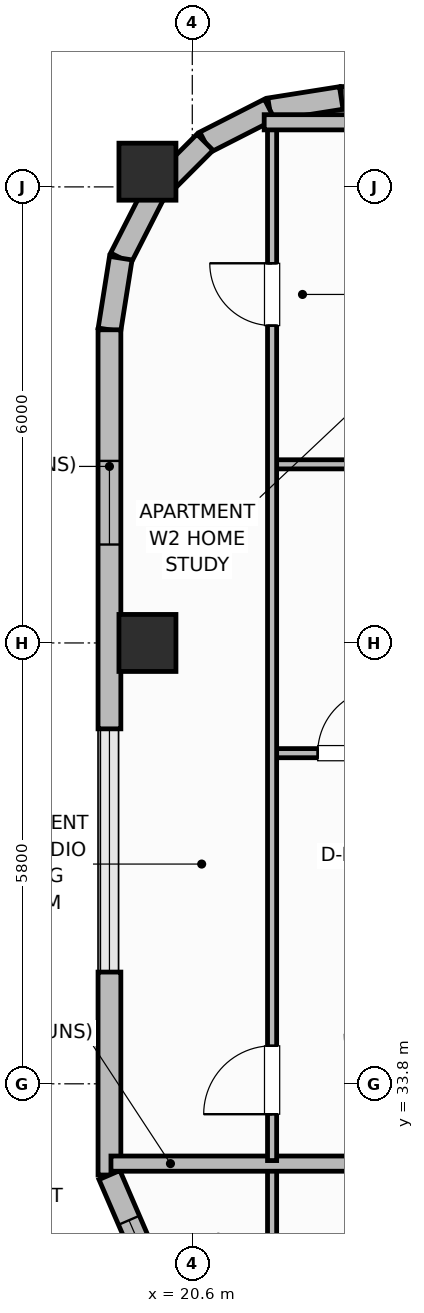
"""IFC4 building model, lengths in metres.
Left out: names, types, materials, properties, quantities, classifications, styles, units other than length and angle.
Written with IfcOpenShell. Run it as: python <this file> out.ifc"""

import sys

from ifc_helpers import new_model, si_unit, direction, frame, frame_2d, origin, origin_2d, place, context, subcontext, project, spatial, rectangle, extrude, element, fill, save


model = new_model("IFC4")
c1 = context("Model", 3, precision=1e-05, world=origin(), true_north=direction((0.0, 1.0)))
c2 = subcontext(c1, "Body", "Model", "MODEL_VIEW")
j1 = project(units=[si_unit("LENGTHUNIT", "METRE"), si_unit("PLANEANGLEUNIT", "RADIAN")], contexts=[c1])
p1 = place(None, origin())
s1 = spatial("IfcSite", under=j1, at=p1, CompositionType="ELEMENT")
p2 = place(p1, origin())
s2 = spatial("IfcBuilding", under=s1, at=p2, CompositionType="ELEMENT")
p3 = place(p2, frame((0.0, 0.0, 293.5)))
s3 = spatial("IfcBuildingStorey", under=s2, at=p3, CompositionType="ELEMENT", Elevation=293.5)
for number, where, z_axis, x_axis in (
    (1, (20.01, 39.6, 0.0), (0.0, 0.0, 1.0), (1.0, 0.0, 0.0)),
    (2, (20.01, 45.8, 0.0), (0.0, 0.0, 1.0), (1.0, 0.0, 0.0)),
):
    element("IfcColumn", number, at=place(p3, frame(where, z_axis=z_axis, x_axis=x_axis)), inside=s3, PredefinedType="COLUMN", context=c2, shape_type="SweptSolid", body=[
        extrude(rectangle(XDim=0.75, YDim=0.75, at=origin_2d()), origin(), (0.0, 0.0, 1.0), 3.7),
    ])
p4 = place(p3, frame((48.19, 46.77, 0.0), z_axis=(0.0, 0.0, 1.0), x_axis=(-1.0, 0.0, 0.0)))
e3 = element("IfcWall", 3, at=p4, inside=s3, PredefinedType="SOLIDWALL", context=c2, shape_type="SweptSolid", body=[
    extrude(rectangle(XDim=25.63, YDim=0.3, at=frame_2d((12.815, 0.0))), origin(), (0.0, 0.0, 1.0), 2.71),
])
p5 = place(p4, frame((1.471, 0.0, 0.74)))
e4 = element("IfcOpeningElement", 4, at=p5, cuts=e3, PredefinedType="OPENING", context=c2, shape_type="SweptSolid", body=[
    extrude(rectangle(XDim=1.4, YDim=1.85, at=frame_2d((0.7, 0.925))), frame((0.0, 0.16, 0.0), z_axis=(0.0, -1.0, 0.0), x_axis=(1.0, 0.0, 0.0)), (0.0, 0.0, 1.0), 0.32),
])
p6 = place(p4, frame((7.553, 0.0, 0.74)))
e5 = element("IfcOpeningElement", 5, at=p6, cuts=e3, PredefinedType="OPENING", context=c2, shape_type="SweptSolid", body=[
    extrude(rectangle(XDim=1.4, YDim=1.85, at=frame_2d((0.7, 0.925))), frame((0.0, 0.16, 0.0), z_axis=(0.0, -1.0, 0.0), x_axis=(1.0, 0.0, 0.0)), (0.0, 0.0, 1.0), 0.32),
])
p7 = place(p4, frame((10.244, 0.0, 0.74)))
e6 = element("IfcOpeningElement", 6, at=p7, cuts=e3, PredefinedType="OPENING", context=c2, shape_type="SweptSolid", body=[
    extrude(rectangle(XDim=1.4, YDim=1.85, at=frame_2d((0.7, 0.925))), frame((0.0, 0.16, 0.0), z_axis=(0.0, -1.0, 0.0), x_axis=(1.0, 0.0, 0.0)), (0.0, 0.0, 1.0), 0.32),
])
p8 = place(p4, frame((14.336, 0.0, 0.74)))
e7 = element("IfcOpeningElement", 7, at=p8, cuts=e3, PredefinedType="OPENING", context=c2, shape_type="SweptSolid", body=[
    extrude(rectangle(XDim=1.4, YDim=1.85, at=frame_2d((0.7, 0.925))), frame((0.0, 0.16, 0.0), z_axis=(0.0, -1.0, 0.0), x_axis=(1.0, 0.0, 0.0)), (0.0, 0.0, 1.0), 0.32),
])
p9 = place(p4, frame((16.677, 0.0, 0.74)))
e8 = element("IfcOpeningElement", 8, at=p9, cuts=e3, PredefinedType="OPENING", context=c2, shape_type="SweptSolid", body=[
    extrude(rectangle(XDim=1.4, YDim=1.85, at=frame_2d((0.7, 0.925))), frame((0.0, 0.16, 0.0), z_axis=(0.0, -1.0, 0.0), x_axis=(1.0, 0.0, 0.0)), (0.0, 0.0, 1.0), 0.32),
])
p10 = place(p4, frame((19.718, 0.0, 0.74)))
e9 = element("IfcOpeningElement", 9, at=p10, cuts=e3, PredefinedType="OPENING", context=c2, shape_type="SweptSolid", body=[
    extrude(rectangle(XDim=1.4, YDim=1.85, at=frame_2d((0.7, 0.925))), frame((0.0, 0.16, 0.0), z_axis=(0.0, -1.0, 0.0), x_axis=(1.0, 0.0, 0.0)), (0.0, 0.0, 1.0), 0.32),
])
p11 = place(p3, frame((22.56, 46.77, 0.0), z_axis=(0.0, 0.0, 1.0), x_axis=(-0.987669453596, -0.156553666304, 0.0)))
e10 = element("IfcWall", 10, at=p11, inside=s3, PredefinedType="SOLIDWALL", context=c2, shape_type="SweptSolid", body=[
    extrude(rectangle(XDim=0.954, YDim=0.3, at=frame_2d((0.477, 0.0))), origin(), (0.0, 0.0, 1.0), 2.71),
])
p12 = place(p3, frame((21.617, 46.621, 0.0), z_axis=(0.0, 0.0, 1.0), x_axis=(-0.891023873617, -0.45395644796, 0.0)))
e11 = element("IfcWall", 11, at=p12, inside=s3, PredefinedType="SOLIDWALL", context=c2, shape_type="SweptSolid", body=[
    extrude(rectangle(XDim=0.954, YDim=0.3, at=frame_2d((0.477, 0.0))), origin(), (0.0, 0.0, 1.0), 2.71),
])
p13 = place(p3, frame((20.767, 46.188, 0.0), z_axis=(0.0, 0.0, 1.0), x_axis=(-0.707106781187, -0.707106781187, 0.0)))
e12 = element("IfcWall", 12, at=p13, inside=s3, PredefinedType="SOLIDWALL", context=c2, shape_type="SweptSolid", body=[
    extrude(rectangle(XDim=0.954, YDim=0.3, at=frame_2d((0.477, 0.0))), origin(), (0.0, 0.0, 1.0), 2.71),
])
p14 = place(p3, frame((20.093, 45.513, 0.0), z_axis=(0.0, 0.0, 1.0), x_axis=(-0.454159573051, -0.890920356825, 0.0)))
e13 = element("IfcWall", 13, at=p14, inside=s3, PredefinedType="SOLIDWALL", context=c2, shape_type="SweptSolid", body=[
    extrude(rectangle(XDim=0.954, YDim=0.3, at=frame_2d((0.477, 0.0))), origin(), (0.0, 0.0, 1.0), 2.71),
])
p15 = place(p3, frame((19.659, 44.663, 0.0), z_axis=(0.0, 0.0, 1.0), x_axis=(-0.156304114255, -0.987708977314, 0.0)))
e14 = element("IfcWall", 14, at=p15, inside=s3, PredefinedType="SOLIDWALL", context=c2, shape_type="SweptSolid", body=[
    extrude(rectangle(XDim=0.954, YDim=0.3, at=frame_2d((0.477, 0.0))), origin(), (0.0, 0.0, 1.0), 2.71),
])
p16 = place(p3, frame((19.51, 43.72, 0.0), z_axis=(0.0, 0.0, 1.0), x_axis=(0.0, -1.0, 0.0)))
e15 = element("IfcWall", 15, at=p16, inside=s3, PredefinedType="SOLIDWALL", context=c2, shape_type="SweptSolid", body=[
    extrude(rectangle(XDim=5.25, YDim=0.3, at=frame_2d((2.625, 0.0))), origin(), (0.0, 0.0, 1.0), 2.71),
])
p17 = place(p16, frame((1.725, 0.0, 0.94)))
e16 = element("IfcOpeningElement", 16, at=p17, cuts=e15, PredefinedType="OPENING", context=c2, shape_type="SweptSolid", body=[
    extrude(rectangle(XDim=1.1, YDim=1.65, at=frame_2d((0.55, 0.825))), frame((0.0, 0.16, 0.0), z_axis=(0.0, -1.0, 0.0), x_axis=(1.0, 0.0, 0.0)), (0.0, 0.0, 1.0), 0.32),
])
p18 = place(p3, frame((19.51, 35.27, 0.0), z_axis=(0.0, 0.0, 1.0), x_axis=(0.0, -1.0, 0.0)))
e17 = element("IfcWall", 17, at=p18, inside=s3, PredefinedType="SOLIDWALL", context=c2, shape_type="SweptSolid", body=[
    extrude(rectangle(XDim=2.67, YDim=0.3, at=frame_2d((1.335, 0.0))), origin(), (0.0, 0.0, 1.0), 2.71),
])
p19 = place(p3, frame((19.51, 32.6, 0.0), z_axis=(0.0, 0.0, 1.0), x_axis=(0.396389181543, -0.918082576218, 0.0)))
e18 = element("IfcWall", 18, at=p19, inside=s3, PredefinedType="SOLIDWALL", context=c2, shape_type="SweptSolid", body=[
    extrude(rectangle(XDim=2.396, YDim=0.3, at=frame_2d((1.198, 0.0))), origin(), (0.0, 0.0, 1.0), 2.71),
])
p20 = place(p19, frame((0.648, 0.0, 0.9)))
e19 = element("IfcOpeningElement", 19, at=p20, cuts=e18, PredefinedType="OPENING", context=c2, shape_type="SweptSolid", body=[
    extrude(rectangle(XDim=1.1, YDim=1.65, at=frame_2d((0.55, 0.825))), frame((0.0, 0.16, 0.0), z_axis=(0.0, -1.0, 0.0), x_axis=(1.0, 0.0, 0.0)), (0.0, 0.0, 1.0), 0.32),
])
p21 = place(p3, frame((21.65, 9.99, 0.0), z_axis=(0.0, 0.0, 1.0), x_axis=(0.0, 1.0, 0.0)))
e20 = element("IfcWall", 20, at=p21, inside=s3, PredefinedType="PARTITIONING", context=c2, shape_type="SweptSolid", body=[
    extrude(rectangle(XDim=22.72, YDim=0.12, at=frame_2d((11.36, 0.0))), origin(), (0.0, 0.0, 1.0), 2.54),
])
p22 = place(p21, frame((0.41, 0.0, 0.0)))
e21 = element("IfcOpeningElement", 21, at=p22, cuts=e20, PredefinedType="OPENING", context=c2, shape_type="SweptSolid", body=[
    extrude(rectangle(XDim=0.9, YDim=2.1, at=frame_2d((0.45, 1.05))), frame((0.0, 0.07, 0.0), z_axis=(0.0, -1.0, 0.0), x_axis=(1.0, 0.0, 0.0)), (0.0, 0.0, 1.0), 0.14),
])
p23 = place(p21, frame((15.535, 0.0, 0.0)))
e22 = element("IfcOpeningElement", 22, at=p23, cuts=e20, PredefinedType="OPENING", context=c2, shape_type="SweptSolid", body=[
    extrude(rectangle(XDim=0.82, YDim=2.08, at=frame_2d((0.41, 1.04))), frame((0.0, 0.07, 0.0), z_axis=(0.0, -1.0, 0.0), x_axis=(1.0, 0.0, 0.0)), (0.0, 0.0, 1.0), 0.14),
])
p24 = place(p3, frame((19.53, 32.75, 0.0), z_axis=(0.0, 0.0, 1.0), x_axis=(1.0, 0.0, 0.0)))
e23 = element("IfcWall", 23, at=p24, inside=s3, PredefinedType="PARTITIONING", context=c2, shape_type="SweptSolid", body=[
    extrude(rectangle(XDim=4.07, YDim=0.2, at=frame_2d((2.035, 0.0))), origin(), (0.0, 0.0, 1.0), 2.54),
])
p25 = place(p3, frame((21.65, 38.15, 0.0), z_axis=(0.0, 0.0, 1.0), x_axis=(1.0, 0.0, 0.0)))
e24 = element("IfcWall", 24, at=p25, inside=s3, PredefinedType="PARTITIONING", context=c2, shape_type="SweptSolid", body=[
    extrude(rectangle(XDim=1.95, YDim=0.12, at=frame_2d((0.975, 0.0))), origin(), (0.0, 0.0, 1.0), 2.54),
])
p26 = place(p25, frame((0.6, 0.0, 0.0)))
e25 = element("IfcOpeningElement", 25, at=p26, cuts=e24, PredefinedType="OPENING", context=c2, shape_type="SweptSolid", body=[
    extrude(rectangle(XDim=0.85, YDim=2.1, at=frame_2d((0.425, 1.05))), frame((0.0, 0.07, 0.0), z_axis=(0.0, -1.0, 0.0), x_axis=(1.0, 0.0, 0.0)), (0.0, 0.0, 1.0), 0.14),
])
p27 = place(p3, frame((21.65, 41.95, 0.0), z_axis=(0.0, 0.0, 1.0), x_axis=(1.0, 0.0, 0.0)))
e26 = element("IfcWall", 26, at=p27, inside=s3, PredefinedType="PARTITIONING", context=c2, shape_type="SweptSolid", body=[
    extrude(rectangle(XDim=1.95, YDim=0.12, at=frame_2d((0.975, 0.0))), origin(), (0.0, 0.0, 1.0), 2.54),
])
p28 = place(p3, frame((21.65, 32.79, 0.0), z_axis=(0.0, 0.0, 1.0), x_axis=(0.0, 1.0, 0.0)))
e27 = element("IfcWall", 27, at=p28, inside=s3, PredefinedType="PARTITIONING", context=c2, shape_type="SweptSolid", body=[
    extrude(rectangle(XDim=13.62, YDim=0.12, at=frame_2d((6.81, 0.0))), origin(), (0.0, 0.0, 1.0), 2.54),
])
p29 = place(p28, frame((0.61, 0.0, 0.0)))
e28 = element("IfcOpeningElement", 28, at=p29, cuts=e27, PredefinedType="OPENING", context=c2, shape_type="SweptSolid", body=[
    extrude(rectangle(XDim=0.9, YDim=2.1, at=frame_2d((0.45, 1.05))), frame((0.0, 0.07, 0.0), z_axis=(0.0, -1.0, 0.0), x_axis=(1.0, 0.0, 0.0)), (0.0, 0.0, 1.0), 0.14),
])
p30 = place(p28, frame((10.985, 0.0, 0.0)))
e29 = element("IfcOpeningElement", 29, at=p30, cuts=e27, PredefinedType="OPENING", context=c2, shape_type="SweptSolid", body=[
    extrude(rectangle(XDim=0.82, YDim=2.08, at=frame_2d((0.41, 1.04))), frame((0.0, 0.07, 0.0), z_axis=(0.0, -1.0, 0.0), x_axis=(1.0, 0.0, 0.0)), (0.0, 0.0, 1.0), 0.14),
])
p31 = place(p3, frame((21.546, 46.45, 0.0), z_axis=(0.0, 0.0, 1.0), x_axis=(1.0, 0.0, 0.0)))
e30 = element("IfcWall", 30, at=p31, inside=s3, PredefinedType="PARTITIONING", context=c2, shape_type="SweptSolid", body=[
    extrude(rectangle(XDim=3.754, YDim=0.2, at=frame_2d((1.877, 0.0))), origin(), (0.0, 0.0, 1.0), 2.54),
])
p32 = place(p17, origin())
e31 = element("IfcWindow", 31, at=p32, inside=s3, PartitioningType="SINGLE_PANEL", PredefinedType="WINDOW", context=c2, shape_type="SweptSolid", body=[
    extrude(rectangle(XDim=1.1, YDim=1.65, at=frame_2d((0.55, 0.825))), frame((0.0, 0.03, 0.0), z_axis=(0.0, -1.0, 0.0), x_axis=(1.0, 0.0, 0.0)), (0.0, 0.0, 1.0), 0.06),
])
fill(e16, e31)
p33 = place(p20, origin())
e32 = element("IfcWindow", 32, at=p33, inside=s3, PartitioningType="SINGLE_PANEL", PredefinedType="WINDOW", context=c2, shape_type="SweptSolid", body=[
    extrude(rectangle(XDim=1.1, YDim=1.65, at=frame_2d((0.55, 0.825))), frame((0.0, 0.03, 0.0), z_axis=(0.0, -1.0, 0.0), x_axis=(1.0, 0.0, 0.0)), (0.0, 0.0, 1.0), 0.06),
])
fill(e19, e32)
p34 = place(p26, origin())
e33 = element("IfcDoor", 33, at=p34, inside=s3, OperationType="SINGLE_SWING_RIGHT", PredefinedType="DOOR", context=c2, shape_type="SweptSolid", body=[
    extrude(rectangle(XDim=0.85, YDim=2.1, at=frame_2d((0.425, 1.05))), frame((0.0, 0.025, 0.0), z_axis=(0.0, -1.0, 0.0), x_axis=(1.0, 0.0, 0.0)), (0.0, 0.0, 1.0), 0.05),
])
fill(e25, e33)
p35 = place(p29, origin())
e34 = element("IfcDoor", 34, at=p35, inside=s3, OperationType="SINGLE_SWING_LEFT", PredefinedType="DOOR", context=c2, shape_type="SweptSolid", body=[
    extrude(rectangle(XDim=0.9, YDim=2.1, at=frame_2d((0.45, 1.05))), frame((0.0, 0.025, 0.0), z_axis=(0.0, -1.0, 0.0), x_axis=(1.0, 0.0, 0.0)), (0.0, 0.0, 1.0), 0.05),
])
fill(e28, e34)
p36 = place(p30, origin())
e35 = element("IfcDoor", 35, at=p36, inside=s3, OperationType="SINGLE_SWING_RIGHT", PredefinedType="DOOR", context=c2, shape_type="SweptSolid", body=[
    extrude(rectangle(XDim=0.82, YDim=2.08, at=frame_2d((0.41, 1.04))), frame((0.0, 0.025, 0.0), z_axis=(0.0, -1.0, 0.0), x_axis=(1.0, 0.0, 0.0)), (0.0, 0.0, 1.0), 0.05),
])
fill(e29, e35)
save(model, sys.argv[1])
